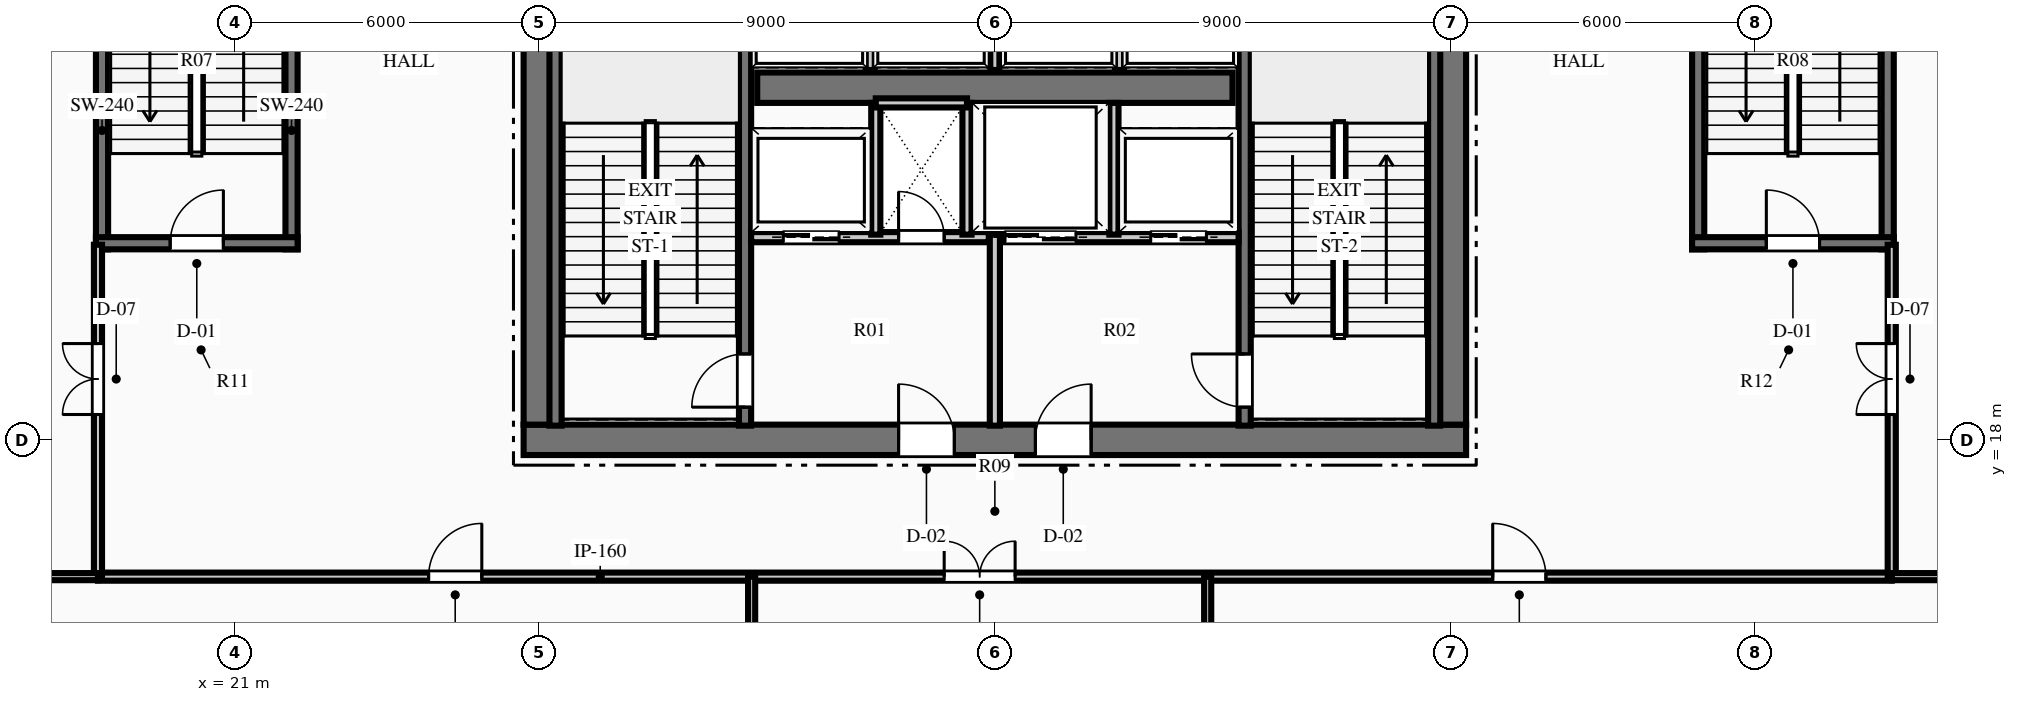
"""IFC4 building model, lengths in metres.
Left out: names, types, materials, properties, quantities, classifications, styles, units other than length and angle.
Written with IfcOpenShell. Run it as: python <this file> out.ifc"""

import sys

from ifc_helpers import new_model, si_unit, direction, frame, frame_2d, origin, place, context, subcontext, project, spatial, rectangle, extrude, element, fill, save


model = new_model("IFC4")
c1 = context("Model", 3, precision=1e-05, world=origin(), true_north=direction((0.0, 1.0)))
c2 = subcontext(c1, "Body", "Model", "MODEL_VIEW")
j1 = project(units=[si_unit("LENGTHUNIT", "METRE"), si_unit("PLANEANGLEUNIT", "RADIAN")], contexts=[c1])
p1 = place(None, origin())
s1 = spatial("IfcSite", under=j1, at=p1, CompositionType="ELEMENT")
p2 = place(p1, origin())
s2 = spatial("IfcBuilding", under=s1, at=p2, CompositionType="ELEMENT")
p3 = place(p2, frame((0.0, 0.0, 16.8)))
s3 = spatial("IfcBuildingStorey", under=s2, at=p3, CompositionType="ELEMENT", Elevation=16.8)
p4 = place(p3, frame((26.7, 18.0, 0.0), z_axis=(0.0, 0.0, 1.0), x_axis=(1.0, 0.0, 0.0)))
e1 = element("IfcWall", 1, at=p4, inside=s3, PredefinedType="SHEAR", context=c2, shape_type="SweptSolid", body=[
    extrude(rectangle(XDim=18.6, YDim=0.6, at=frame_2d((9.3, 0.0))), origin(), (0.0, 0.0, 1.0), 5.4),
])
p5 = place(p4, frame((7.4, 0.0, 0.0)))
e2 = element("IfcOpeningElement", 2, at=p5, cuts=e1, PredefinedType="OPENING", context=c2, shape_type="SweptSolid", body=[
    extrude(rectangle(XDim=1.1, YDim=2.15, at=frame_2d((0.55, 1.075))), frame((0.0, 0.31, 0.0), z_axis=(0.0, -1.0, 0.0), x_axis=(1.0, 0.0, 0.0)), (0.0, 0.0, 1.0), 0.62),
])
p6 = place(p4, frame((10.1, 0.0, 0.0)))
e3 = element("IfcOpeningElement", 3, at=p6, cuts=e1, PredefinedType="OPENING", context=c2, shape_type="SweptSolid", body=[
    extrude(rectangle(XDim=1.1, YDim=2.15, at=frame_2d((0.55, 1.075))), frame((0.0, 0.31, 0.0), z_axis=(0.0, -1.0, 0.0), x_axis=(1.0, 0.0, 0.0)), (0.0, 0.0, 1.0), 0.62),
])
p7 = place(p3, frame((27.0, 18.3, 0.0), z_axis=(0.0, 0.0, 1.0), x_axis=(0.0, 1.0, 0.0)))
e4 = element("IfcWall", 4, at=p7, inside=s3, PredefinedType="SHEAR", context=c2, shape_type="SweptSolid", body=[
    extrude(rectangle(XDim=15.4, YDim=0.6, at=frame_2d((7.7, 0.0))), origin(), (0.0, 0.0, 1.0), 5.4),
])
p8 = place(p7, frame((9.94, 0.0, 0.0)))
e5 = element("IfcOpeningElement", 5, at=p8, cuts=e4, PredefinedType="OPENING", context=c2, shape_type="SweptSolid", body=[
    extrude(rectangle(XDim=1.4, YDim=2.2, at=frame_2d((0.7, 1.1))), frame((0.0, 0.31, 0.0), z_axis=(0.0, -1.0, 0.0), x_axis=(1.0, 0.0, 0.0)), (0.0, 0.0, 1.0), 0.62),
])
p9 = place(p3, frame((45.0, 18.3, 0.0), z_axis=(0.0, 0.0, 1.0), x_axis=(0.0, 1.0, 0.0)))
e6 = element("IfcWall", 6, at=p9, inside=s3, PredefinedType="SHEAR", context=c2, shape_type="SweptSolid", body=[
    extrude(rectangle(XDim=15.4, YDim=0.6, at=frame_2d((7.7, 0.0))), origin(), (0.0, 0.0, 1.0), 5.4),
])
p10 = place(p9, frame((9.94, 0.0, 0.0)))
e7 = element("IfcOpeningElement", 7, at=p10, cuts=e6, PredefinedType="OPENING", context=c2, shape_type="SweptSolid", body=[
    extrude(rectangle(XDim=1.4, YDim=2.2, at=frame_2d((0.7, 1.1))), frame((0.0, 0.31, 0.0), z_axis=(0.0, -1.0, 0.0), x_axis=(1.0, 0.0, 0.0)), (0.0, 0.0, 1.0), 0.62),
])
p11 = place(p3, frame((31.31, 24.95, 0.0), z_axis=(0.0, 0.0, 1.0), x_axis=(1.0, 0.0, 0.0)))
e8 = element("IfcWall", 8, at=p11, inside=s3, PredefinedType="SHEAR", context=c2, shape_type="SweptSolid", body=[
    extrude(rectangle(XDim=9.38, YDim=0.6, at=frame_2d((4.69, 0.0))), origin(), (0.0, 0.0, 1.0), 5.4),
])
p12 = place(p3, frame((31.07, 18.28, 0.0), z_axis=(0.0, 0.0, 1.0), x_axis=(0.0, 1.0, 0.0)))
e9 = element("IfcWall", 9, at=p12, inside=s3, PredefinedType="SHEAR", context=c2, shape_type="SweptSolid", body=[
    extrude(rectangle(XDim=8.26, YDim=0.24, at=frame_2d((4.13, 0.0))), origin(), (0.0, 0.0, 1.0), 5.4),
])
p13 = place(p12, frame((0.365, 0.0, 0.0)))
e10 = element("IfcOpeningElement", 10, at=p13, cuts=e9, PredefinedType="OPENING", context=c2, shape_type="SweptSolid", body=[
    extrude(rectangle(XDim=1.05, YDim=2.15, at=frame_2d((0.525, 1.075))), frame((0.0, 0.13, 0.0), z_axis=(0.0, -1.0, 0.0), x_axis=(1.0, 0.0, 0.0)), (0.0, 0.0, 1.0), 0.26),
])
p14 = place(p3, frame((27.33, 18.28, 0.0), z_axis=(0.0, 0.0, 1.0), x_axis=(0.0, 1.0, 0.0)))
e11 = element("IfcWall", 11, at=p14, inside=s3, PredefinedType="SHEAR", context=c2, shape_type="SweptSolid", body=[
    extrude(rectangle(XDim=8.26, YDim=0.24, at=frame_2d((4.13, 0.0))), origin(), (0.0, 0.0, 1.0), 5.4),
])
p15 = place(p3, frame((40.93, 18.28, 0.0), z_axis=(0.0, 0.0, 1.0), x_axis=(0.0, 1.0, 0.0)))
e12 = element("IfcWall", 12, at=p15, inside=s3, PredefinedType="SHEAR", context=c2, shape_type="SweptSolid", body=[
    extrude(rectangle(XDim=8.26, YDim=0.24, at=frame_2d((4.13, 0.0))), origin(), (0.0, 0.0, 1.0), 5.4),
])
p16 = place(p15, frame((0.365, 0.0, 0.0)))
e13 = element("IfcOpeningElement", 13, at=p16, cuts=e12, PredefinedType="OPENING", context=c2, shape_type="SweptSolid", body=[
    extrude(rectangle(XDim=1.05, YDim=2.15, at=frame_2d((0.525, 1.075))), frame((0.0, 0.13, 0.0), z_axis=(0.0, -1.0, 0.0), x_axis=(1.0, 0.0, 0.0)), (0.0, 0.0, 1.0), 0.26),
])
p17 = place(p3, frame((44.67, 18.28, 0.0), z_axis=(0.0, 0.0, 1.0), x_axis=(0.0, 1.0, 0.0)))
e14 = element("IfcWall", 14, at=p17, inside=s3, PredefinedType="SHEAR", context=c2, shape_type="SweptSolid", body=[
    extrude(rectangle(XDim=8.26, YDim=0.24, at=frame_2d((4.13, 0.0))), origin(), (0.0, 0.0, 1.0), 5.4),
])
for number, where, z_axis, x_axis in (
    (15, (18.38, 21.76, 0.0), (0.0, 0.0, 1.0), (0.0, 1.0, 0.0)),
    (16, (22.12, 21.76, 0.0), (0.0, 0.0, 1.0), (0.0, 1.0, 0.0)),
):
    element("IfcWall", number, at=place(p3, frame(where, z_axis=z_axis, x_axis=x_axis)), inside=s3, PredefinedType="SHEAR", context=c2, shape_type="SweptSolid", body=[
        extrude(rectangle(XDim=8.38, YDim=0.24, at=frame_2d((4.19, 0.0))), origin(), (0.0, 0.0, 1.0), 5.4),
    ])
p18 = place(p3, frame((18.26, 21.88, 0.0), z_axis=(0.0, 0.0, 1.0), x_axis=(1.0, 0.0, 0.0)))
e17 = element("IfcWall", 17, at=p18, inside=s3, PredefinedType="SHEAR", context=c2, shape_type="SweptSolid", body=[
    extrude(rectangle(XDim=3.98, YDim=0.24, at=frame_2d((1.99, 0.0))), origin(), (0.0, 0.0, 1.0), 5.4),
])
p19 = place(p18, frame((1.465, 0.0, 0.0)))
e18 = element("IfcOpeningElement", 18, at=p19, cuts=e17, PredefinedType="OPENING", context=c2, shape_type="SweptSolid", body=[
    extrude(rectangle(XDim=1.05, YDim=2.15, at=frame_2d((0.525, 1.075))), frame((0.0, 0.13, 0.0), z_axis=(0.0, -1.0, 0.0), x_axis=(1.0, 0.0, 0.0)), (0.0, 0.0, 1.0), 0.26),
])
for number, where, z_axis, x_axis in (
    (19, (49.88, 21.76, 0.0), (0.0, 0.0, 1.0), (0.0, 1.0, 0.0)),
    (20, (53.62, 21.76, 0.0), (0.0, 0.0, 1.0), (0.0, 1.0, 0.0)),
):
    element("IfcWall", number, at=place(p3, frame(where, z_axis=z_axis, x_axis=x_axis)), inside=s3, PredefinedType="SHEAR", context=c2, shape_type="SweptSolid", body=[
        extrude(rectangle(XDim=8.38, YDim=0.24, at=frame_2d((4.19, 0.0))), origin(), (0.0, 0.0, 1.0), 5.4),
    ])
p20 = place(p3, frame((49.76, 21.88, 0.0), z_axis=(0.0, 0.0, 1.0), x_axis=(1.0, 0.0, 0.0)))
e21 = element("IfcWall", 21, at=p20, inside=s3, PredefinedType="SHEAR", context=c2, shape_type="SweptSolid", body=[
    extrude(rectangle(XDim=3.98, YDim=0.24, at=frame_2d((1.99, 0.0))), origin(), (0.0, 0.0, 1.0), 5.4),
])
p21 = place(p20, frame((1.465, 0.0, 0.0)))
e22 = element("IfcOpeningElement", 22, at=p21, cuts=e21, PredefinedType="OPENING", context=c2, shape_type="SweptSolid", body=[
    extrude(rectangle(XDim=1.05, YDim=2.15, at=frame_2d((0.525, 1.075))), frame((0.0, 0.13, 0.0), z_axis=(0.0, -1.0, 0.0), x_axis=(1.0, 0.0, 0.0)), (0.0, 0.0, 1.0), 0.26),
])
p22 = place(p3, frame((36.0, 18.28, 0.0), z_axis=(0.0, 0.0, 1.0), x_axis=(0.0, 1.0, 0.0)))
e23 = element("IfcWall", 23, at=p22, inside=s3, PredefinedType="PARTITIONING", context=c2, shape_type="SweptSolid", body=[
    extrude(rectangle(XDim=3.77, YDim=0.2, at=frame_2d((1.885, 0.0))), origin(), (0.0, 0.0, 1.0), 4.98),
])
p23 = place(p3, frame((31.19, 22.0, 0.0), z_axis=(0.0, 0.0, 1.0), x_axis=(1.0, 0.0, 0.0)))
e24 = element("IfcWall", 24, at=p23, inside=s3, PredefinedType="PARTITIONING", context=c2, shape_type="SweptSolid", body=[
    extrude(rectangle(XDim=4.69, YDim=0.2, at=frame_2d((2.345, 0.0))), origin(), (0.0, 0.0, 1.0), 4.98),
])
p24 = place(p23, frame((2.91, 0.0, 0.0)))
e25 = element("IfcOpeningElement", 25, at=p24, cuts=e24, PredefinedType="OPENING", context=c2, shape_type="SweptSolid", body=[
    extrude(rectangle(XDim=0.9, YDim=2.15, at=frame_2d((0.45, 1.075))), frame((0.0, 0.11, 0.0), z_axis=(0.0, -1.0, 0.0), x_axis=(1.0, 0.0, 0.0)), (0.0, 0.0, 1.0), 0.22),
])
p25 = place(p23, frame((0.635, 0.0, 0.0)))
e26 = element("IfcOpeningElement", 26, at=p25, cuts=e24, PredefinedType="OPENING", context=c2, shape_type="SweptSolid", body=[
    extrude(rectangle(XDim=1.1, YDim=2.15, at=frame_2d((0.55, 1.075))), frame((0.0, 0.11, 0.0), z_axis=(0.0, -1.0, 0.0), x_axis=(1.0, 0.0, 0.0)), (0.0, 0.0, 1.0), 0.22),
])
p26 = place(p3, frame((36.12, 22.0, 0.0), z_axis=(0.0, 0.0, 1.0), x_axis=(1.0, 0.0, 0.0)))
e27 = element("IfcWall", 27, at=p26, inside=s3, PredefinedType="PARTITIONING", context=c2, shape_type="SweptSolid", body=[
    extrude(rectangle(XDim=4.69, YDim=0.2, at=frame_2d((2.345, 0.0))), origin(), (0.0, 0.0, 1.0), 4.98),
])
p27 = place(p26, frame((2.955, 0.0, 0.0)))
e28 = element("IfcOpeningElement", 28, at=p27, cuts=e27, PredefinedType="OPENING", context=c2, shape_type="SweptSolid", body=[
    extrude(rectangle(XDim=1.1, YDim=2.15, at=frame_2d((0.55, 1.075))), frame((0.0, 0.11, 0.0), z_axis=(0.0, -1.0, 0.0), x_axis=(1.0, 0.0, 0.0)), (0.0, 0.0, 1.0), 0.22),
])
p28 = place(p26, frame((0.08, 0.0, 0.0)))
e29 = element("IfcOpeningElement", 29, at=p28, cuts=e27, PredefinedType="OPENING", context=c2, shape_type="SweptSolid", body=[
    extrude(rectangle(XDim=1.4, YDim=2.2, at=frame_2d((0.7, 1.1))), frame((0.0, 0.11, 0.0), z_axis=(0.0, -1.0, 0.0), x_axis=(1.0, 0.0, 0.0)), (0.0, 0.0, 1.0), 0.22),
])
for number, where, z_axis, x_axis in (
    (30, (33.65, 22.05, 0.0), (0.0, 0.0, 1.0), (0.0, 1.0, 0.0)),
    (31, (35.45, 22.05, 0.0), (0.0, 0.0, 1.0), (0.0, 1.0, 0.0)),
):
    element("IfcWall", number, at=place(p3, frame(where, z_axis=z_axis, x_axis=x_axis)), inside=s3, PredefinedType="PARTITIONING", context=c2, shape_type="SweptSolid", body=[
        extrude(rectangle(XDim=2.6, YDim=0.18, at=frame_2d((1.3, 0.0))), origin(), (0.0, 0.0, 1.0), 4.98),
    ])
p29 = place(p3, frame((33.65, 24.65, 0.0), z_axis=(0.0, 0.0, 1.0), x_axis=(1.0, 0.0, 0.0)))
e32 = element("IfcWall", 32, at=p29, inside=s3, PredefinedType="PARTITIONING", context=c2, shape_type="SweptSolid", body=[
    extrude(rectangle(XDim=1.8, YDim=0.18, at=frame_2d((0.9, 0.0))), origin(), (0.0, 0.0, 1.0), 4.98),
])
p30 = place(p3, frame((38.35, 22.05, 0.0), z_axis=(0.0, 0.0, 1.0), x_axis=(0.0, 1.0, 0.0)))
e33 = element("IfcWall", 33, at=p30, inside=s3, PredefinedType="PARTITIONING", context=c2, shape_type="SweptSolid", body=[
    extrude(rectangle(XDim=2.6, YDim=0.18, at=frame_2d((1.3, 0.0))), origin(), (0.0, 0.0, 1.0), 4.98),
])
for number, where, z_axis, x_axis in (
    (34, (33.54, 25.3, 0.0), (0.0, 0.0, 1.0), (0.0, 1.0, 0.0)),
    (35, (36.0, 25.3, 0.0), (0.0, 0.0, 1.0), (0.0, 1.0, 0.0)),
    (36, (38.46, 25.3, 0.0), (0.0, 0.0, 1.0), (0.0, 1.0, 0.0)),
):
    element("IfcWall", number, at=place(p3, frame(where, z_axis=z_axis, x_axis=x_axis)), inside=s3, PredefinedType="PARTITIONING", context=c2, shape_type="SweptSolid", body=[
        extrude(rectangle(XDim=1.9, YDim=0.18, at=frame_2d((0.95, 0.0))), origin(), (0.0, 0.0, 1.0), 4.98),
    ])
p31 = place(p3, frame((18.3, 15.3, 0.0), z_axis=(0.0, 0.0, 1.0), x_axis=(1.0, 0.0, 0.0)))
e37 = element("IfcWall", 37, at=p31, inside=s3, PredefinedType="PARTITIONING", context=c2, shape_type="SweptSolid", body=[
    extrude(rectangle(XDim=35.4, YDim=0.16, at=frame_2d((17.7, 0.0))), origin(), (0.0, 0.0, 1.0), 4.202),
])
p32 = place(p31, frame((6.525, 0.0, 0.0)))
e38 = element("IfcOpeningElement", 38, at=p32, cuts=e37, PredefinedType="OPENING", context=c2, shape_type="SweptSolid", body=[
    extrude(rectangle(XDim=1.05, YDim=2.15, at=frame_2d((0.525, 1.075))), frame((0.0, 0.09, 0.0), z_axis=(0.0, -1.0, 0.0), x_axis=(1.0, 0.0, 0.0)), (0.0, 0.0, 1.0), 0.18),
])
p33 = place(p31, frame((16.7, 0.0, 0.0)))
e39 = element("IfcOpeningElement", 39, at=p33, cuts=e37, PredefinedType="OPENING", context=c2, shape_type="SweptSolid", body=[
    extrude(rectangle(XDim=1.4, YDim=2.2, at=frame_2d((0.7, 1.1))), frame((0.0, 0.09, 0.0), z_axis=(0.0, -1.0, 0.0), x_axis=(1.0, 0.0, 0.0)), (0.0, 0.0, 1.0), 0.18),
])
p34 = place(p31, frame((27.525, 0.0, 0.0)))
e40 = element("IfcOpeningElement", 40, at=p34, cuts=e37, PredefinedType="OPENING", context=c2, shape_type="SweptSolid", body=[
    extrude(rectangle(XDim=1.05, YDim=2.15, at=frame_2d((0.525, 1.075))), frame((0.0, 0.09, 0.0), z_axis=(0.0, -1.0, 0.0), x_axis=(1.0, 0.0, 0.0)), (0.0, 0.0, 1.0), 0.18),
])
p35 = place(p3, frame((18.3, 15.3, 0.0), z_axis=(0.0, 0.0, 1.0), x_axis=(0.0, 1.0, 0.0)))
e41 = element("IfcWall", 41, at=p35, inside=s3, PredefinedType="PARTITIONING", context=c2, shape_type="SweptSolid", body=[
    extrude(rectangle(XDim=6.55, YDim=0.16, at=frame_2d((3.275, 0.0))), origin(), (0.0, 0.0, 1.0), 4.98),
])
p36 = place(p35, frame((3.2, 0.0, 0.0)))
e42 = element("IfcOpeningElement", 42, at=p36, cuts=e41, PredefinedType="OPENING", context=c2, shape_type="SweptSolid", body=[
    extrude(rectangle(XDim=1.4, YDim=2.2, at=frame_2d((0.7, 1.1))), frame((0.0, 0.09, 0.0), z_axis=(0.0, -1.0, 0.0), x_axis=(1.0, 0.0, 0.0)), (0.0, 0.0, 1.0), 0.18),
])
p37 = place(p3, frame((53.7, 15.3, 0.0), z_axis=(0.0, 0.0, 1.0), x_axis=(0.0, 1.0, 0.0)))
e43 = element("IfcWall", 43, at=p37, inside=s3, PredefinedType="PARTITIONING", context=c2, shape_type="SweptSolid", body=[
    extrude(rectangle(XDim=6.55, YDim=0.16, at=frame_2d((3.275, 0.0))), origin(), (0.0, 0.0, 1.0), 4.98),
])
p38 = place(p37, frame((3.2, 0.0, 0.0)))
e44 = element("IfcOpeningElement", 44, at=p38, cuts=e43, PredefinedType="OPENING", context=c2, shape_type="SweptSolid", body=[
    extrude(rectangle(XDim=1.4, YDim=2.2, at=frame_2d((0.7, 1.1))), frame((0.0, 0.09, 0.0), z_axis=(0.0, -1.0, 0.0), x_axis=(1.0, 0.0, 0.0)), (0.0, 0.0, 1.0), 0.18),
])
for number, where, z_axis, x_axis in (
    (45, (8.54, 15.3, 0.0), (0.0, 0.0, 1.0), (1.0, 0.0, 0.0)),
    (46, (53.7, 15.3, 0.0), (0.0, 0.0, 1.0), (1.0, 0.0, 0.0)),
):
    element("IfcWall", number, at=place(p3, frame(where, z_axis=z_axis, x_axis=x_axis)), inside=s3, PredefinedType="PARTITIONING", context=c2, shape_type="SweptSolid", body=[
        extrude(rectangle(XDim=9.76, YDim=0.14, at=frame_2d((4.88, 0.0))), origin(), (0.0, 0.0, 1.0), 4.202),
    ])
for number, where, z_axis, x_axis in (
    (47, (31.2, 9.04, 0.0), (0.0, 0.0, 1.0), (0.0, 1.0, 0.0)),
    (48, (40.2, 9.04, 0.0), (0.0, 0.0, 1.0), (0.0, 1.0, 0.0)),
):
    element("IfcWall", number, at=place(p3, frame(where, z_axis=z_axis, x_axis=x_axis)), inside=s3, PredefinedType="PARTITIONING", context=c2, shape_type="SweptSolid", body=[
        extrude(rectangle(XDim=6.26, YDim=0.14, at=frame_2d((3.13, 0.0))), origin(), (0.0, 0.0, 1.0), 4.98),
    ])
p39 = place(p13, origin())
e49 = element("IfcDoor", 49, at=p39, inside=s3, OperationType="SINGLE_SWING_LEFT", PredefinedType="DOOR", context=c2, shape_type="SweptSolid", body=[
    extrude(rectangle(XDim=1.05, YDim=2.15, at=frame_2d((0.525, 1.075))), frame((0.0, 0.025, 0.0), z_axis=(0.0, -1.0, 0.0), x_axis=(1.0, 0.0, 0.0)), (0.0, 0.0, 1.0), 0.05),
])
fill(e10, e49)
p40 = place(p16, origin())
e50 = element("IfcDoor", 50, at=p40, inside=s3, OperationType="SINGLE_SWING_RIGHT", PredefinedType="DOOR", context=c2, shape_type="SweptSolid", body=[
    extrude(rectangle(XDim=1.05, YDim=2.15, at=frame_2d((0.525, 1.075))), frame((0.0, 0.025, 0.0), z_axis=(0.0, -1.0, 0.0), x_axis=(1.0, 0.0, 0.0)), (0.0, 0.0, 1.0), 0.05),
])
fill(e13, e50)
p41 = place(p5, origin())
e51 = element("IfcDoor", 51, at=p41, inside=s3, OperationType="SINGLE_SWING_LEFT", PredefinedType="DOOR", context=c2, shape_type="SweptSolid", body=[
    extrude(rectangle(XDim=1.1, YDim=2.15, at=frame_2d((0.55, 1.075))), frame((0.0, 0.025, 0.0), z_axis=(0.0, -1.0, 0.0), x_axis=(1.0, 0.0, 0.0)), (0.0, 0.0, 1.0), 0.05),
])
fill(e2, e51)
p42 = place(p6, origin())
e52 = element("IfcDoor", 52, at=p42, inside=s3, OperationType="SINGLE_SWING_RIGHT", PredefinedType="DOOR", context=c2, shape_type="SweptSolid", body=[
    extrude(rectangle(XDim=1.1, YDim=2.15, at=frame_2d((0.55, 1.075))), frame((0.0, 0.025, 0.0), z_axis=(0.0, -1.0, 0.0), x_axis=(1.0, 0.0, 0.0)), (0.0, 0.0, 1.0), 0.05),
])
fill(e3, e52)
p43 = place(p24, origin())
e53 = element("IfcDoor", 53, at=p43, inside=s3, OperationType="SINGLE_SWING_LEFT", PredefinedType="DOOR", context=c2, shape_type="SweptSolid", body=[
    extrude(rectangle(XDim=0.9, YDim=2.15, at=frame_2d((0.45, 1.075))), frame((0.0, 0.025, 0.0), z_axis=(0.0, -1.0, 0.0), x_axis=(1.0, 0.0, 0.0)), (0.0, 0.0, 1.0), 0.05),
])
fill(e25, e53)
p44 = place(p19, origin())
e54 = element("IfcDoor", 54, at=p44, inside=s3, OperationType="SINGLE_SWING_RIGHT", PredefinedType="DOOR", context=c2, shape_type="SweptSolid", body=[
    extrude(rectangle(XDim=1.05, YDim=2.15, at=frame_2d((0.525, 1.075))), frame((0.0, 0.025, 0.0), z_axis=(0.0, -1.0, 0.0), x_axis=(1.0, 0.0, 0.0)), (0.0, 0.0, 1.0), 0.05),
])
fill(e18, e54)
p45 = place(p21, origin())
e55 = element("IfcDoor", 55, at=p45, inside=s3, OperationType="SINGLE_SWING_LEFT", PredefinedType="DOOR", context=c2, shape_type="SweptSolid", body=[
    extrude(rectangle(XDim=1.05, YDim=2.15, at=frame_2d((0.525, 1.075))), frame((0.0, 0.025, 0.0), z_axis=(0.0, -1.0, 0.0), x_axis=(1.0, 0.0, 0.0)), (0.0, 0.0, 1.0), 0.05),
])
fill(e22, e55)
p46 = place(p32, origin())
e56 = element("IfcDoor", 56, at=p46, inside=s3, OperationType="SINGLE_SWING_RIGHT", PredefinedType="DOOR", context=c2, shape_type="SweptSolid", body=[
    extrude(rectangle(XDim=1.05, YDim=2.15, at=frame_2d((0.525, 1.075))), frame((0.0, 0.025, 0.0), z_axis=(0.0, -1.0, 0.0), x_axis=(1.0, 0.0, 0.0)), (0.0, 0.0, 1.0), 0.05),
])
fill(e38, e56)
p47 = place(p33, origin())
e57 = element("IfcDoor", 57, at=p47, inside=s3, OperationType="DOUBLE_DOOR_SINGLE_SWING", PredefinedType="DOOR", context=c2, shape_type="SweptSolid", body=[
    extrude(rectangle(XDim=1.4, YDim=2.2, at=frame_2d((0.7, 1.1))), frame((0.0, 0.025, 0.0), z_axis=(0.0, -1.0, 0.0), x_axis=(1.0, 0.0, 0.0)), (0.0, 0.0, 1.0), 0.05),
])
fill(e39, e57)
p48 = place(p34, origin())
e58 = element("IfcDoor", 58, at=p48, inside=s3, OperationType="SINGLE_SWING_LEFT", PredefinedType="DOOR", context=c2, shape_type="SweptSolid", body=[
    extrude(rectangle(XDim=1.05, YDim=2.15, at=frame_2d((0.525, 1.075))), frame((0.0, 0.025, 0.0), z_axis=(0.0, -1.0, 0.0), x_axis=(1.0, 0.0, 0.0)), (0.0, 0.0, 1.0), 0.05),
])
fill(e40, e58)
p49 = place(p36, origin())
e59 = element("IfcDoor", 59, at=p49, inside=s3, OperationType="DOUBLE_DOOR_SINGLE_SWING", PredefinedType="DOOR", context=c2, shape_type="SweptSolid", body=[
    extrude(rectangle(XDim=1.4, YDim=2.2, at=frame_2d((0.7, 1.1))), frame((0.0, 0.025, 0.0), z_axis=(0.0, -1.0, 0.0), x_axis=(1.0, 0.0, 0.0)), (0.0, 0.0, 1.0), 0.05),
])
fill(e42, e59)
p50 = place(p38, origin())
e60 = element("IfcDoor", 60, at=p50, inside=s3, OperationType="DOUBLE_DOOR_SINGLE_SWING", PredefinedType="DOOR", context=c2, shape_type="SweptSolid", body=[
    extrude(rectangle(XDim=1.4, YDim=2.2, at=frame_2d((0.7, 1.1))), frame((0.0, 0.025, 0.0), z_axis=(0.0, -1.0, 0.0), x_axis=(1.0, 0.0, 0.0)), (0.0, 0.0, 1.0), 0.05),
])
fill(e44, e60)
p51 = place(p25, origin())
e61 = element("IfcDoor", 61, at=p51, inside=s3, OperationType="SLIDING_TO_LEFT", PredefinedType="DOOR", context=c2, shape_type="SweptSolid", body=[
    extrude(rectangle(XDim=1.1, YDim=2.15, at=frame_2d((0.55, 1.075))), frame((0.0, 0.025, 0.0), z_axis=(0.0, -1.0, 0.0), x_axis=(1.0, 0.0, 0.0)), (0.0, 0.0, 1.0), 0.05),
])
fill(e26, e61)
p52 = place(p27, origin())
e62 = element("IfcDoor", 62, at=p52, inside=s3, OperationType="SLIDING_TO_LEFT", PredefinedType="DOOR", context=c2, shape_type="SweptSolid", body=[
    extrude(rectangle(XDim=1.1, YDim=2.15, at=frame_2d((0.55, 1.075))), frame((0.0, 0.025, 0.0), z_axis=(0.0, -1.0, 0.0), x_axis=(1.0, 0.0, 0.0)), (0.0, 0.0, 1.0), 0.05),
])
fill(e28, e62)
p53 = place(p28, origin())
e63 = element("IfcDoor", 63, at=p53, inside=s3, OperationType="SLIDING_TO_LEFT", PredefinedType="DOOR", context=c2, shape_type="SweptSolid", body=[
    extrude(rectangle(XDim=1.4, YDim=2.2, at=frame_2d((0.7, 1.1))), frame((0.0, 0.025, 0.0), z_axis=(0.0, -1.0, 0.0), x_axis=(1.0, 0.0, 0.0)), (0.0, 0.0, 1.0), 0.05),
])
fill(e29, e63)
save(model, sys.argv[1])
